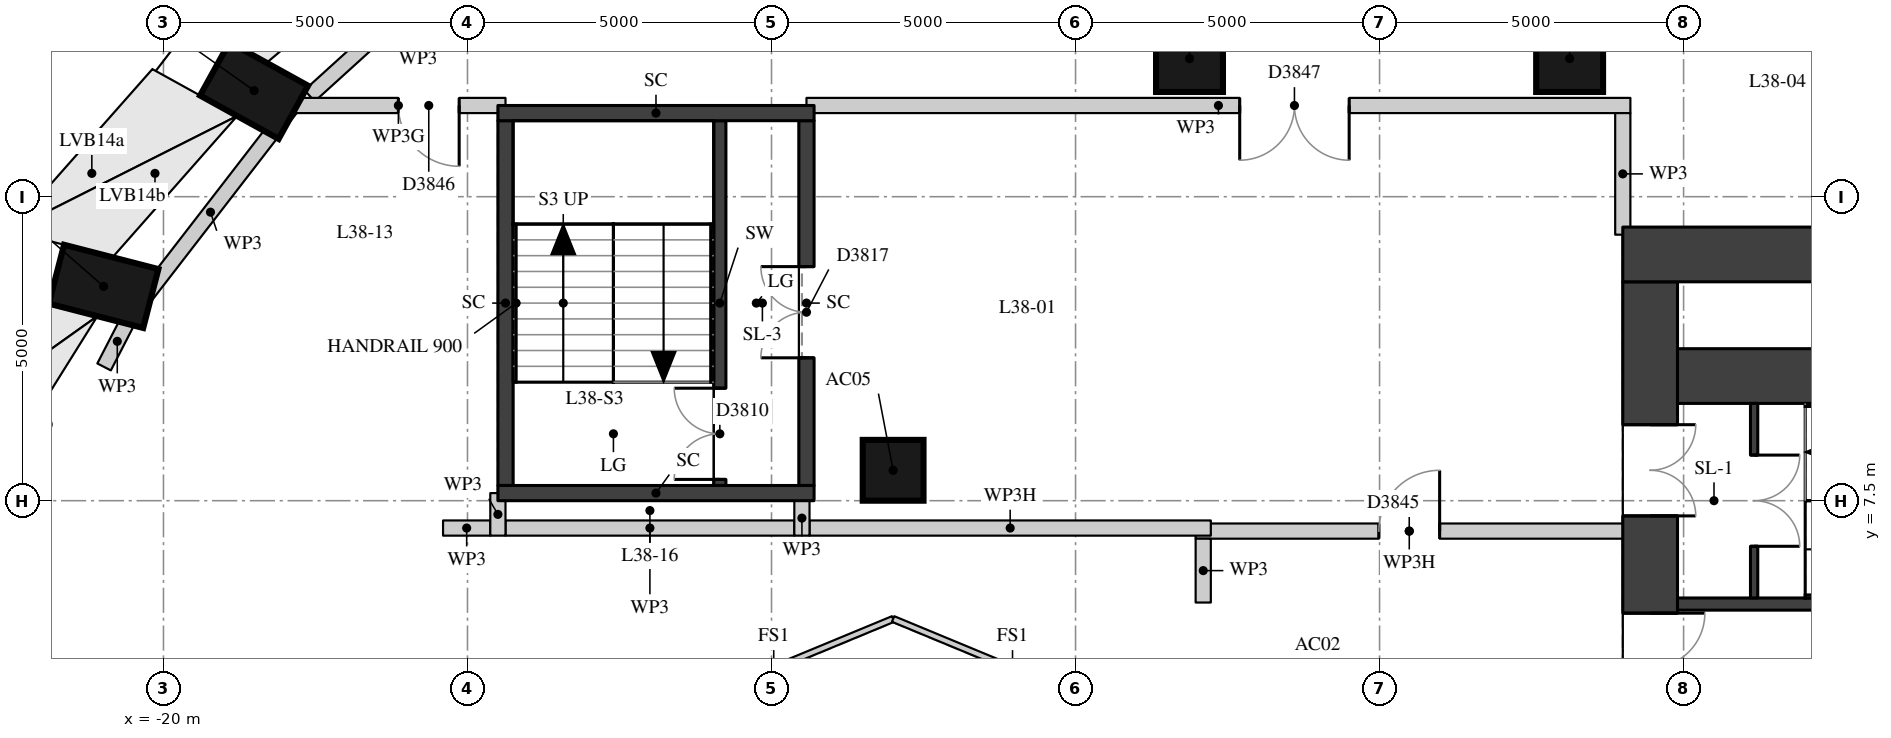
"""IFC4 building model, lengths in metres.
Left out: names, types, materials, properties, quantities, classifications, styles, units other than length and angle.
Written with IfcOpenShell. Run it as: python <this file> out.ifc"""

import sys

from ifc_helpers import new_model, si_unit, direction, frame, frame_2d, origin, origin_2d, place, context, subcontext, project, spatial, rectangle, extrude, element, fill, save


model = new_model("IFC4")
c1 = context("Model", 3, precision=1e-05, world=origin(), true_north=direction((0.0, 1.0)))
c2 = subcontext(c1, "Body", "Model", "MODEL_VIEW")
j1 = project(units=[si_unit("LENGTHUNIT", "METRE"), si_unit("PLANEANGLEUNIT", "RADIAN")], contexts=[c1])
p1 = place(None, origin())
s1 = spatial("IfcSite", under=j1, at=p1, CompositionType="ELEMENT")
p2 = place(p1, origin())
s2 = spatial("IfcBuilding", under=s1, at=p2, CompositionType="ELEMENT")
p3 = place(p2, frame((0.0, 0.0, 135.1)))
s3 = spatial("IfcBuildingStorey", under=s2, at=p3, CompositionType="ELEMENT", Elevation=135.1)
p4 = place(p3, frame((-19.156, 14.602, 0.261), z_axis=(0.304420915631, -0.168349196586, 0.937542774563), x_axis=(-0.820443324529, 0.453717098388, 0.347870012886)))
e1 = element("IfcColumn", 1, at=p4, inside=s3, PredefinedType="COLUMN", context=c2, shape_type="SweptSolid", body=[
    extrude(rectangle(XDim=1.5, YDim=1.0, at=origin_2d()), origin(), (0.0, 0.0, 1.0), 4.243),
])
p5 = place(p3, frame((-21.76, 11.225, 0.283), z_axis=(0.365276327981, -0.094192558458, 0.926121464036), x_axis=(-0.896785344432, 0.231250972235, 0.377225441682)))
e2 = element("IfcColumn", 2, at=p5, inside=s3, PredefinedType="COLUMN", context=c2, shape_type="SweptSolid", body=[
    extrude(rectangle(XDim=1.5, YDim=1.0, at=origin_2d()), origin(), (0.0, 0.0, 1.0), 4.248),
])
p6 = place(p3, frame((-23.679, 7.489, 0.307), z_axis=(0.409253591825, -0.012323462499, 0.912337453934), x_axis=(-0.911924110745, 0.027459899693, 0.409439092113)))
e3 = element("IfcColumn", 3, at=p6, inside=s3, PredefinedType="COLUMN", context=c2, shape_type="SweptSolid", body=[
    extrude(rectangle(XDim=1.5, YDim=1.0, at=origin_2d()), origin(), (0.0, 0.0, 1.0), 4.259),
])
p7 = place(p3, frame((-8.0, 8.0, 0.0), z_axis=(0.0, 0.0, 1.0), x_axis=(1.0, 0.0, 0.0)))
e4 = element("IfcColumn", 4, at=p7, inside=s3, PredefinedType="COLUMN", context=c2, shape_type="SweptSolid", body=[
    extrude(rectangle(XDim=1.0, YDim=1.0, at=origin_2d()), origin(), (0.0, 0.0, 1.0), 4.5),
])
for number, where, z_axis, x_axis in (
    (5, (3.126, 14.772, 0.0), (0.0, 0.0, 1.0), (1.0, 0.0, 0.0)),
    (6, (-3.126, 14.772, 0.0), (0.0, 0.0, 1.0), (1.0, 0.0, 0.0)),
):
    element("IfcColumn", number, at=place(p3, frame(where, z_axis=z_axis, x_axis=x_axis)), inside=s3, PredefinedType="COLUMN", context=c2, shape_type="SweptSolid", body=[
        extrude(rectangle(XDim=1.1, YDim=1.1, at=origin_2d()), origin(), (0.0, 0.0, 1.0), 4.5),
    ])
p8 = place(p3, frame((4.45, -11.1, 0.0), z_axis=(0.0, 0.0, 1.0), x_axis=(0.0, 1.0, 0.0)))
e7 = element("IfcWall", 7, at=p8, inside=s3, PredefinedType="SHEAR", context=c2, shape_type="SweptSolid", body=[
    extrude(rectangle(XDim=22.2, YDim=0.9, at=frame_2d((11.1, 0.0))), origin(), (0.0, 0.0, 1.0), 4.09),
])
p9 = place(p8, frame((2.35, 0.0, 0.0)))
e8 = element("IfcOpeningElement", 8, at=p9, cuts=e7, PredefinedType="OPENING", context=c2, shape_type="SweptSolid", body=[
    extrude(rectangle(XDim=1.5, YDim=2.1, at=frame_2d((0.75, 1.05))), frame((0.0, 0.46, 0.0), z_axis=(0.0, -1.0, 0.0), x_axis=(1.0, 0.0, 0.0)), (0.0, 0.0, 1.0), 0.92),
])
p10 = place(p8, frame((5.45, 0.0, 0.0)))
e9 = element("IfcOpeningElement", 9, at=p10, cuts=e7, PredefinedType="OPENING", context=c2, shape_type="SweptSolid", body=[
    extrude(rectangle(XDim=1.8, YDim=2.1, at=frame_2d((0.9, 1.05))), frame((0.0, 0.46, 0.0), z_axis=(0.0, -1.0, 0.0), x_axis=(1.0, 0.0, 0.0)), (0.0, 0.0, 1.0), 0.92),
])
p11 = place(p8, frame((7.95, 0.0, 0.0)))
e10 = element("IfcOpeningElement", 10, at=p11, cuts=e7, PredefinedType="OPENING", context=c2, shape_type="SweptSolid", body=[
    extrude(rectangle(XDim=1.1, YDim=2.1, at=frame_2d((0.55, 1.05))), frame((0.0, 0.46, 0.0), z_axis=(0.0, -1.0, 0.0), x_axis=(1.0, 0.0, 0.0)), (0.0, 0.0, 1.0), 0.92),
])
p12 = place(p8, frame((10.6, 0.0, 0.0)))
e11 = element("IfcOpeningElement", 11, at=p12, cuts=e7, PredefinedType="OPENING", context=c2, shape_type="SweptSolid", body=[
    extrude(rectangle(XDim=1.0, YDim=2.1, at=frame_2d((0.5, 1.05))), frame((0.0, 0.46, 0.0), z_axis=(0.0, -1.0, 0.0), x_axis=(1.0, 0.0, 0.0)), (0.0, 0.0, 1.0), 0.92),
])
p13 = place(p8, frame((13.15, 0.0, 0.0)))
e12 = element("IfcOpeningElement", 12, at=p13, cuts=e7, PredefinedType="OPENING", context=c2, shape_type="SweptSolid", body=[
    extrude(rectangle(XDim=1.1, YDim=2.1, at=frame_2d((0.55, 1.05))), frame((0.0, 0.46, 0.0), z_axis=(0.0, -1.0, 0.0), x_axis=(1.0, 0.0, 0.0)), (0.0, 0.0, 1.0), 0.92),
])
p14 = place(p8, frame((14.95, 0.0, 0.0)))
e13 = element("IfcOpeningElement", 13, at=p14, cuts=e7, PredefinedType="OPENING", context=c2, shape_type="SweptSolid", body=[
    extrude(rectangle(XDim=1.8, YDim=2.1, at=frame_2d((0.9, 1.05))), frame((0.0, 0.46, 0.0), z_axis=(0.0, -1.0, 0.0), x_axis=(1.0, 0.0, 0.0)), (0.0, 0.0, 1.0), 0.92),
])
p15 = place(p8, frame((18.35, 0.0, 0.0)))
e14 = element("IfcOpeningElement", 14, at=p15, cuts=e7, PredefinedType="OPENING", context=c2, shape_type="SweptSolid", body=[
    extrude(rectangle(XDim=1.5, YDim=2.1, at=frame_2d((0.75, 1.05))), frame((0.0, 0.46, 0.0), z_axis=(0.0, -1.0, 0.0), x_axis=(1.0, 0.0, 0.0)), (0.0, 0.0, 1.0), 0.92),
])
p16 = place(p3, frame((4.0, 11.55, 0.0), z_axis=(0.0, 0.0, 1.0), x_axis=(1.0, 0.0, 0.0)))
e15 = element("IfcWall", 15, at=p16, inside=s3, PredefinedType="SHEAR", context=c2, shape_type="SweptSolid", body=[
    extrude(rectangle(XDim=15.2, YDim=0.9, at=frame_2d((7.6, 0.0))), origin(), (0.0, 0.0, 1.0), 4.09),
])
p17 = place(p3, frame((4.9, 9.55, 0.0), z_axis=(0.0, 0.0, 1.0), x_axis=(1.0, 0.0, 0.0)))
e16 = element("IfcWall", 16, at=p17, inside=s3, PredefinedType="SHEAR", context=c2, shape_type="SweptSolid", body=[
    extrude(rectangle(XDim=10.2, YDim=0.9, at=frame_2d((5.1, 0.0))), origin(), (0.0, 0.0, 1.0), 4.09),
])
p18 = place(p3, frame((4.9, 5.8, 0.0), z_axis=(0.0, 0.0, 1.0), x_axis=(1.0, 0.0, 0.0)))
e17 = element("IfcWall", 17, at=p18, inside=s3, PredefinedType="SHEAR", context=c2, shape_type="SweptSolid", body=[
    extrude(rectangle(XDim=10.2, YDim=0.2, at=frame_2d((5.1, 0.0))), origin(), (0.0, 0.0, 1.0), 4.09),
])
p19 = place(p3, frame((6.16, 5.9, 0.0), z_axis=(0.0, 0.0, 1.0), x_axis=(0.0, 1.0, 0.0)))
e18 = element("IfcWall", 18, at=p19, inside=s3, PredefinedType="SHEAR", context=c2, shape_type="SweptSolid", body=[
    extrude(rectangle(XDim=3.2, YDim=0.12, at=frame_2d((1.6, 0.0))), origin(), (0.0, 0.0, 1.0), 4.09),
])
p20 = place(p19, frame((0.85, 0.0, 0.0)))
e19 = element("IfcOpeningElement", 19, at=p20, cuts=e18, PredefinedType="OPENING", context=c2, shape_type="SweptSolid", body=[
    extrude(rectangle(XDim=1.5, YDim=2.1, at=frame_2d((0.75, 1.05))), frame((0.0, 0.07, 0.0), z_axis=(0.0, -1.0, 0.0), x_axis=(1.0, 0.0, 0.0)), (0.0, 0.0, 1.0), 0.14),
])
p21 = place(p3, frame((-10.85, 7.75, 0.0), z_axis=(0.0, 0.0, 1.0), x_axis=(0.0, 1.0, 0.0)))
e20 = element("IfcWall", 20, at=p21, inside=s3, PredefinedType="SHEAR", context=c2, shape_type="SweptSolid", body=[
    extrude(rectangle(XDim=6.0, YDim=0.2, at=frame_2d((3.0, 0.0))), origin(), (0.0, 0.0, 1.0), 4.09),
])
p22 = place(p21, frame((0.1, 0.0, 0.0)))
e21 = element("IfcOpeningElement", 21, at=p22, cuts=e20, PredefinedType="OPENING", context=c2, shape_type="SweptSolid", body=[
    extrude(rectangle(XDim=1.5, YDim=2.1, at=frame_2d((0.75, 1.05))), frame((0.0, 0.11, 0.0), z_axis=(0.0, -1.0, 0.0), x_axis=(1.0, 0.0, 0.0)), (0.0, 0.0, 1.0), 0.22),
])
p23 = place(p3, frame((-14.375, 7.75, -0.45), z_axis=(0.0, 0.0, 1.0), x_axis=(0.0, 1.0, 0.0)))
e22 = element("IfcWall", 22, at=p23, inside=s3, PredefinedType="SHEAR", context=c2, shape_type="SweptSolid", body=[
    extrude(rectangle(XDim=6.0, YDim=0.25, at=frame_2d((3.0, 0.0))), origin(), (0.0, 0.0, 1.0), 4.54),
])
p24 = place(p3, frame((-9.425, 7.75, -0.45), z_axis=(0.0, 0.0, 1.0), x_axis=(0.0, 1.0, 0.0)))
e23 = element("IfcWall", 23, at=p24, inside=s3, PredefinedType="SHEAR", context=c2, shape_type="SweptSolid", body=[
    extrude(rectangle(XDim=6.0, YDim=0.25, at=frame_2d((3.0, 0.0))), origin(), (0.0, 0.0, 1.0), 4.54),
])
p25 = place(p24, frame((2.1, 0.0, 0.45)))
e24 = element("IfcOpeningElement", 24, at=p25, cuts=e23, PredefinedType="OPENING", context=c2, shape_type="SweptSolid", body=[
    extrude(rectangle(XDim=1.5, YDim=2.1, at=frame_2d((0.75, 1.05))), frame((0.0, 0.135, 0.0), z_axis=(0.0, -1.0, 0.0), x_axis=(1.0, 0.0, 0.0)), (0.0, 0.0, 1.0), 0.27),
])
for number, where, z_axis, x_axis in (
    (25, (-14.5, 13.875, -0.45), (0.0, 0.0, 1.0), (1.0, 0.0, 0.0)),
    (26, (-14.5, 7.625, -0.45), (0.0, 0.0, 1.0), (1.0, 0.0, 0.0)),
):
    element("IfcWall", number, at=place(p3, frame(where, z_axis=z_axis, x_axis=x_axis)), inside=s3, PredefinedType="SHEAR", context=c2, shape_type="SweptSolid", body=[
        extrude(rectangle(XDim=5.2, YDim=0.25, at=frame_2d((2.6, 0.0))), origin(), (0.0, 0.0, 1.0), 4.54),
    ])
p26 = place(p3, frame((-15.086, 16.438, 0.0), z_axis=(0.0, 0.0, 1.0), x_axis=(-0.740584857479, -0.671962847836, 0.0)))
e27 = element("IfcWall", 27, at=p26, inside=s3, PredefinedType="PARTITIONING", context=c2, shape_type="SweptSolid", body=[
    extrude(rectangle(XDim=3.391, YDim=0.25, at=frame_2d((1.695, 0.0))), origin(), (0.0, 0.0, 1.0), 4.09),
])
p27 = place(p3, frame((-20.543, 10.542, 0.0), z_axis=(0.0, 0.0, 1.0), x_axis=(-0.458005967528, -0.888949117615, 0.0)))
e28 = element("IfcWall", 28, at=p27, inside=s3, PredefinedType="PARTITIONING", context=c2, shape_type="SweptSolid", body=[
    extrude(rectangle(XDim=0.947, YDim=0.25, at=frame_2d((0.474, 0.0))), origin(), (0.0, 0.0, 1.0), 4.09),
])
p28 = place(p3, frame((-17.91, 13.949, 0.0), z_axis=(0.0, 0.0, 1.0), x_axis=(-0.611397470005, -0.791323659239, 0.0)))
e29 = element("IfcWall", 29, at=p28, inside=s3, PredefinedType="PARTITIONING", context=c2, shape_type="SweptSolid", body=[
    extrude(rectangle(XDim=4.305, YDim=0.25, at=frame_2d((2.153, 0.0))), origin(), (0.0, 0.0, 1.0), 4.09),
])
p29 = place(p3, frame((-3.025, 7.0, 0.0), z_axis=(0.0, 0.0, 1.0), x_axis=(1.0, 0.0, 0.0)))
e30 = element("IfcWall", 30, at=p29, inside=s3, PredefinedType="PARTITIONING", context=c2, shape_type="SweptSolid", body=[
    extrude(rectangle(XDim=7.027, YDim=0.25, at=frame_2d((3.513, 0.0))), origin(), (0.0, 0.0, 1.0), 3.54),
])
p30 = place(p29, frame((3.013, 0.0, 0.0)))
e31 = element("IfcOpeningElement", 31, at=p30, cuts=e30, PredefinedType="OPENING", context=c2, shape_type="SweptSolid", body=[
    extrude(rectangle(XDim=1.0, YDim=2.1, at=frame_2d((0.5, 1.05))), frame((0.0, 0.135, 0.0), z_axis=(0.0, -1.0, 0.0), x_axis=(1.0, 0.0, 0.0)), (0.0, 0.0, 1.0), 0.27),
])
p31 = place(p3, frame((-15.402, 7.05, 0.0), z_axis=(0.0, 0.0, 1.0), x_axis=(1.0, 0.0, 0.0)))
e32 = element("IfcWall", 32, at=p31, inside=s3, PredefinedType="PARTITIONING", context=c2, shape_type="SweptSolid", body=[
    extrude(rectangle(XDim=0.777, YDim=0.25, at=frame_2d((0.389, 0.0))), origin(), (0.0, 0.0, 1.0), 4.09),
])
p32 = place(p3, frame((-14.375, 7.05, 0.0), z_axis=(0.0, 0.0, 1.0), x_axis=(1.0, 0.0, 0.0)))
e33 = element("IfcWall", 33, at=p32, inside=s3, PredefinedType="PARTITIONING", context=c2, shape_type="SweptSolid", body=[
    extrude(rectangle(XDim=4.75, YDim=0.25, at=frame_2d((2.375, 0.0))), origin(), (0.0, 0.0, 1.0), 4.09),
])
p33 = place(p3, frame((-9.375, 7.05, 0.0), z_axis=(0.0, 0.0, 1.0), x_axis=(1.0, 0.0, 0.0)))
e34 = element("IfcWall", 34, at=p33, inside=s3, PredefinedType="PARTITIONING", context=c2, shape_type="SweptSolid", body=[
    extrude(rectangle(XDim=6.6, YDim=0.25, at=frame_2d((3.3, 0.0))), origin(), (0.0, 0.0, 1.0), 3.54),
])
p34 = place(p3, frame((-17.898, 14.0, 0.0), z_axis=(0.0, 0.0, 1.0), x_axis=(1.0, 0.0, 0.0)))
e35 = element("IfcWall", 35, at=p34, inside=s3, PredefinedType="PARTITIONING", context=c2, shape_type="SweptSolid", body=[
    extrude(rectangle(XDim=3.523, YDim=0.25, at=frame_2d((1.762, 0.0))), origin(), (0.0, 0.0, 1.0), 3.64),
])
p35 = place(p34, frame((1.761, 0.0, 0.0)))
e36 = element("IfcOpeningElement", 36, at=p35, cuts=e35, PredefinedType="OPENING", context=c2, shape_type="SweptSolid", body=[
    extrude(rectangle(XDim=1.0, YDim=2.1, at=frame_2d((0.5, 1.05))), frame((0.0, 0.135, 0.0), z_axis=(0.0, -1.0, 0.0), x_axis=(1.0, 0.0, 0.0)), (0.0, 0.0, 1.0), 0.27),
])
p36 = place(p3, frame((-9.425, 14.0, 0.0), z_axis=(0.0, 0.0, 1.0), x_axis=(1.0, 0.0, 0.0)))
e37 = element("IfcWall", 37, at=p36, inside=s3, PredefinedType="PARTITIONING", context=c2, shape_type="SweptSolid", body=[
    extrude(rectangle(XDim=13.55, YDim=0.25, at=frame_2d((6.775, 0.0))), origin(), (0.0, 0.0, 1.0), 4.09),
])
p37 = place(p36, frame((7.125, 0.0, 0.0)))
e38 = element("IfcOpeningElement", 38, at=p37, cuts=e37, PredefinedType="OPENING", context=c2, shape_type="SweptSolid", body=[
    extrude(rectangle(XDim=1.8, YDim=2.1, at=frame_2d((0.9, 1.05))), frame((0.0, 0.135, 0.0), z_axis=(0.0, -1.0, 0.0), x_axis=(1.0, 0.0, 0.0)), (0.0, 0.0, 1.0), 0.27),
])
p38 = place(p3, frame((-14.5, 6.925, 0.0), z_axis=(0.0, 0.0, 1.0), x_axis=(0.0, 1.0, 0.0)))
e39 = element("IfcWall", 39, at=p38, inside=s3, PredefinedType="PARTITIONING", context=c2, shape_type="SweptSolid", body=[
    extrude(rectangle(XDim=0.7, YDim=0.25, at=frame_2d((0.35, 0.0))), origin(), (0.0, 0.0, 1.0), 4.09),
])
p39 = place(p3, frame((-9.5, 6.925, 0.0), z_axis=(0.0, 0.0, 1.0), x_axis=(0.0, 1.0, 0.0)))
e40 = element("IfcWall", 40, at=p39, inside=s3, PredefinedType="PARTITIONING", context=c2, shape_type="SweptSolid", body=[
    extrude(rectangle(XDim=0.577, YDim=0.25, at=frame_2d((0.289, 0.0))), origin(), (0.0, 0.0, 1.0), 4.09),
])
p40 = place(p3, frame((-2.9, 5.825, 0.0), z_axis=(0.0, 0.0, 1.0), x_axis=(0.0, 1.0, 0.0)))
e41 = element("IfcWall", 41, at=p40, inside=s3, PredefinedType="PARTITIONING", context=c2, shape_type="SweptSolid", body=[
    extrude(rectangle(XDim=1.05, YDim=0.25, at=frame_2d((0.525, 0.0))), origin(), (0.0, 0.0, 1.0), 4.09),
])
p41 = place(p3, frame((4.0, 11.875, 0.0), z_axis=(0.0, 0.0, 1.0), x_axis=(0.0, 1.0, 0.0)))
e42 = element("IfcWall", 42, at=p41, inside=s3, PredefinedType="PARTITIONING", context=c2, shape_type="SweptSolid", body=[
    extrude(rectangle(XDim=2.0, YDim=0.25, at=frame_2d((1.0, 0.0))), origin(), (0.0, 0.0, 1.0), 4.09),
])
for number, where, z_axis, x_axis in (
    (43, (-11.927, 3.927, 0.0), (0.0, 0.0, 1.0), (0.924, 0.383, 0.0)),
    (44, (-8.0, 5.554, 0.0), (0.0, 0.0, 1.0), (0.924, -0.383, 0.0)),
):
    element("IfcWall", number, at=place(p3, frame(where, z_axis=z_axis, x_axis=x_axis)), inside=s3, PredefinedType="PARTITIONING", context=c2, shape_type="SweptSolid", body=[
        extrude(rectangle(XDim=4.251, YDim=0.1, at=frame_2d((2.125, 0.0))), origin(), (0.0, 0.0, 1.0), 4.09),
    ])
p42 = place(p14, origin())
e45 = element("IfcDoor", 45, at=p42, inside=s3, OperationType="DOUBLE_DOOR_SINGLE_SWING", PredefinedType="DOOR", context=c2, shape_type="SweptSolid", body=[
    extrude(rectangle(XDim=1.8, YDim=2.1, at=frame_2d((0.9, 1.05))), frame((0.0, 0.025, 0.0), z_axis=(0.0, -1.0, 0.0), x_axis=(1.0, 0.0, 0.0)), (0.0, 0.0, 1.0), 0.05),
])
fill(e13, e45)
p43 = place(p15, origin())
e46 = element("IfcDoor", 46, at=p43, inside=s3, OperationType="DOUBLE_DOOR_SINGLE_SWING", PredefinedType="DOOR", context=c2, shape_type="SweptSolid", body=[
    extrude(rectangle(XDim=1.5, YDim=2.1, at=frame_2d((0.75, 1.05))), frame((0.0, 0.025, 0.0), z_axis=(0.0, -1.0, 0.0), x_axis=(1.0, 0.0, 0.0)), (0.0, 0.0, 1.0), 0.05),
])
fill(e14, e46)
p44 = place(p20, origin())
e47 = element("IfcDoor", 47, at=p44, inside=s3, OperationType="DOUBLE_DOOR_SINGLE_SWING", PredefinedType="DOOR", context=c2, shape_type="SweptSolid", body=[
    extrude(rectangle(XDim=1.5, YDim=2.1, at=frame_2d((0.75, 1.05))), frame((0.0, 0.025, 0.0), z_axis=(0.0, -1.0, 0.0), x_axis=(1.0, 0.0, 0.0)), (0.0, 0.0, 1.0), 0.05),
])
fill(e19, e47)
p45 = place(p22, origin())
e48 = element("IfcDoor", 48, at=p45, inside=s3, OperationType="DOUBLE_DOOR_SINGLE_SWING", PredefinedType="DOOR", context=c2, shape_type="SweptSolid", body=[
    extrude(rectangle(XDim=1.5, YDim=2.1, at=frame_2d((0.75, 1.05))), frame((0.0, 0.025, 0.0), z_axis=(0.0, -1.0, 0.0), x_axis=(1.0, 0.0, 0.0)), (0.0, 0.0, 1.0), 0.05),
])
fill(e21, e48)
p46 = place(p25, origin())
e49 = element("IfcDoor", 49, at=p46, inside=s3, OperationType="DOUBLE_DOOR_SINGLE_SWING", PredefinedType="DOOR", context=c2, shape_type="SweptSolid", body=[
    extrude(rectangle(XDim=1.5, YDim=2.1, at=frame_2d((0.75, 1.05))), frame((0.0, 0.025, 0.0), z_axis=(0.0, -1.0, 0.0), x_axis=(1.0, 0.0, 0.0)), (0.0, 0.0, 1.0), 0.05),
])
fill(e24, e49)
p47 = place(p37, origin())
e50 = element("IfcDoor", 50, at=p47, inside=s3, OperationType="DOUBLE_DOOR_SINGLE_SWING", PredefinedType="DOOR", context=c2, shape_type="SweptSolid", body=[
    extrude(rectangle(XDim=1.8, YDim=2.1, at=frame_2d((0.9, 1.05))), frame((0.0, 0.025, 0.0), z_axis=(0.0, -1.0, 0.0), x_axis=(1.0, 0.0, 0.0)), (0.0, 0.0, 1.0), 0.05),
])
fill(e38, e50)
p48 = place(p35, origin())
e51 = element("IfcDoor", 51, at=p48, inside=s3, OperationType="SINGLE_SWING_LEFT", PredefinedType="DOOR", context=c2, shape_type="SweptSolid", body=[
    extrude(rectangle(XDim=1.0, YDim=2.1, at=frame_2d((0.5, 1.05))), frame((0.0, 0.025, 0.0), z_axis=(0.0, -1.0, 0.0), x_axis=(1.0, 0.0, 0.0)), (0.0, 0.0, 1.0), 0.05),
])
fill(e36, e51)
p49 = place(p30, origin())
e52 = element("IfcDoor", 52, at=p49, inside=s3, OperationType="SINGLE_SWING_RIGHT", PredefinedType="DOOR", context=c2, shape_type="SweptSolid", body=[
    extrude(rectangle(XDim=1.0, YDim=2.1, at=frame_2d((0.5, 1.05))), frame((0.0, 0.025, 0.0), z_axis=(0.0, -1.0, 0.0), x_axis=(1.0, 0.0, 0.0)), (0.0, 0.0, 1.0), 0.05),
])
fill(e31, e52)
save(model, sys.argv[1])
